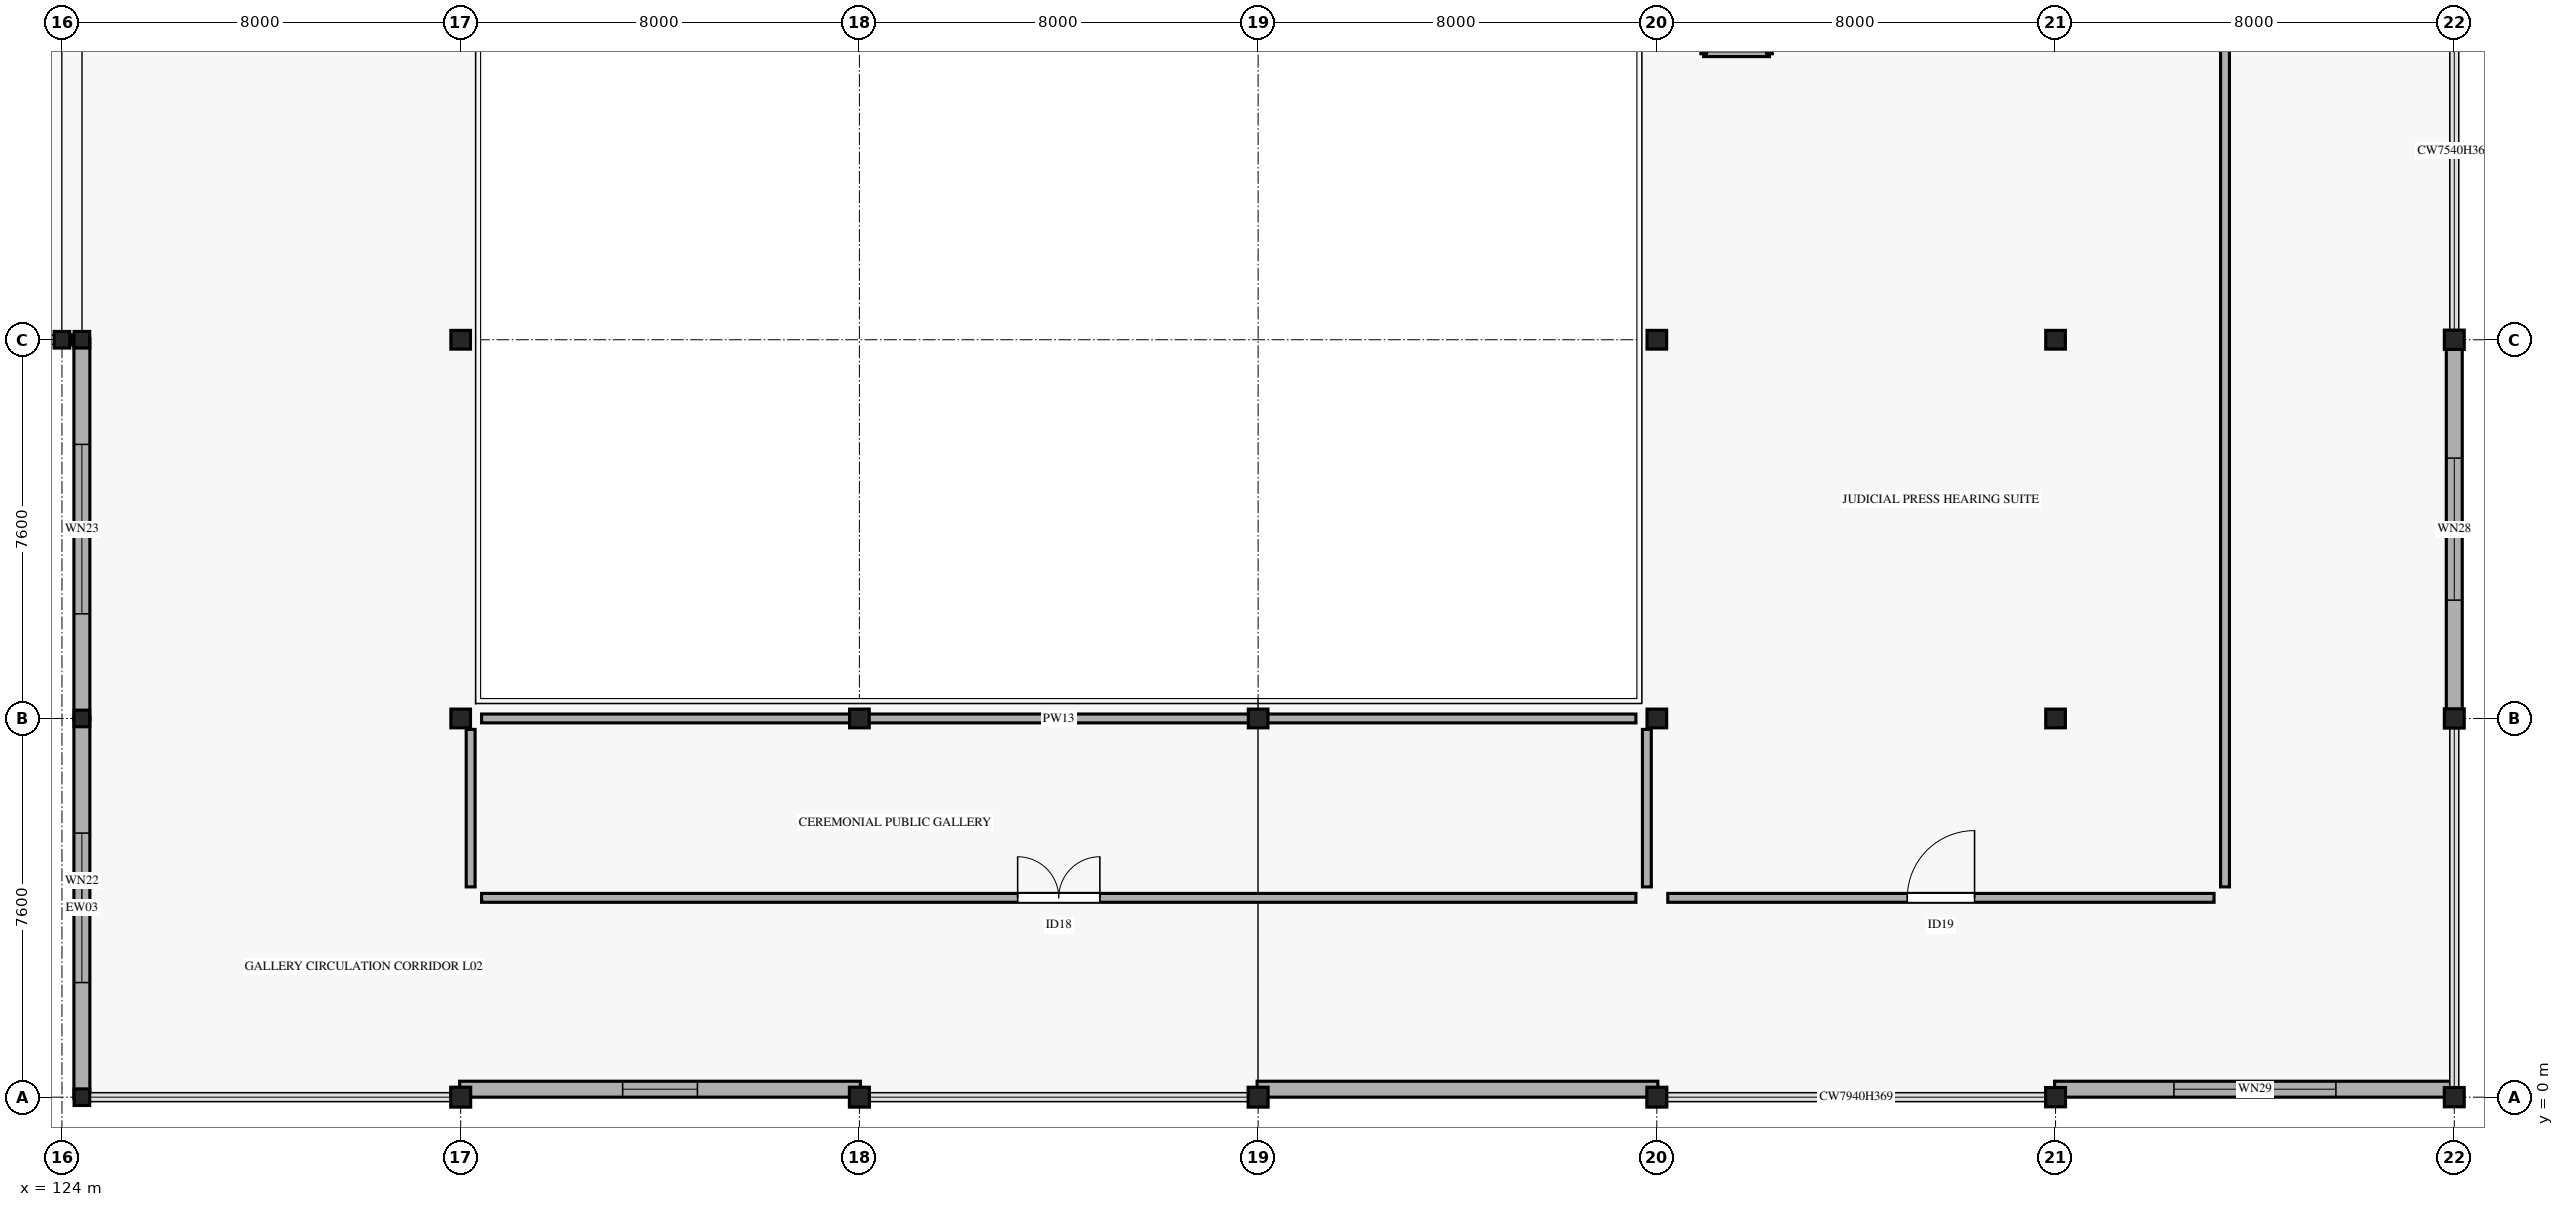
"""IFC4 building model, lengths in metres.
Left out: names, types, materials, properties, quantities, classifications, styles, units other than length and angle.
Written with IfcOpenShell. Run it as: python <this file> out.ifc"""

import sys

from ifc_helpers import new_model, si_unit, direction, frame, frame_2d, origin, origin_2d, place, context, subcontext, project, spatial, rectangle, i_section, extrude, element, fill, save


model = new_model("IFC4")
c1 = context("Model", 3, precision=1e-05, world=origin(), true_north=direction((0.0, 1.0)))
c2 = subcontext(c1, "Body", "Model", "MODEL_VIEW")
j1 = project(units=[si_unit("LENGTHUNIT", "METRE"), si_unit("PLANEANGLEUNIT", "RADIAN")], contexts=[c1])
p1 = place(None, origin())
s1 = spatial("IfcSite", under=j1, at=p1, CompositionType="ELEMENT")
p2 = place(p1, origin())
s2 = spatial("IfcBuilding", under=s1, at=p2, CompositionType="ELEMENT")
p3 = place(p2, frame((0.0, 0.0, 10.8)))
s3 = spatial("IfcBuildingStorey", under=s2, at=p3, CompositionType="ELEMENT", Elevation=10.8)
for number, where, z_axis, x_axis in (
    (1, (124.4, 0.0, 0.0), (0.0, 0.0, 1.0), (1.0, 0.0, 0.0)),
    (2, (124.4, 7.6, 0.0), (0.0, 0.0, 1.0), (1.0, 0.0, 0.0)),
    (3, (124.4, 15.2, 0.0), (0.0, 0.0, 1.0), (1.0, 0.0, 0.0)),
):
    element("IfcColumn", number, at=place(p3, frame(where, z_axis=z_axis, x_axis=x_axis)), inside=s3, PredefinedType="COLUMN", context=c2, shape_type="SweptSolid", body=[
        extrude(i_section(OverallWidth=0.313, OverallDepth=0.333, WebThickness=0.018, FlangeThickness=0.028, FilletRadius=0.015, at=origin_2d()), origin(), (0.0, 0.0, 1.0), 4.59),
    ])
p4 = place(p3, frame((132.0, 0.0, 0.0), z_axis=(0.0, 0.0, 1.0), x_axis=(1.0, 0.0, 0.0)))
e4 = element("IfcColumn", 4, at=p4, inside=s3, PredefinedType="COLUMN", context=c2, shape_type="SweptSolid", body=[
    extrude(i_section(OverallWidth=0.401, OverallDepth=0.399, WebThickness=0.025, FlangeThickness=0.04, FilletRadius=0.015, at=origin_2d()), origin(), (0.0, 0.0, 1.0), 4.59),
])
for number, where, z_axis, x_axis in (
    (5, (132.0, 7.6, 0.0), (0.0, 0.0, 1.0), (1.0, 0.0, 0.0)),
    (6, (132.0, 15.2, 0.0), (0.0, 0.0, 1.0), (1.0, 0.0, 0.0)),
):
    element("IfcColumn", number, at=place(p3, frame(where, z_axis=z_axis, x_axis=x_axis)), inside=s3, PredefinedType="COLUMN", context=c2, shape_type="SweptSolid", body=[
        extrude(i_section(OverallWidth=0.394, OverallDepth=0.376, WebThickness=0.017, FlangeThickness=0.028, FilletRadius=0.015, at=origin_2d()), origin(), (0.0, 0.0, 1.0), 4.59),
    ])
p5 = place(p3, frame((140.0, 0.0, 0.0), z_axis=(0.0, 0.0, 1.0), x_axis=(1.0, 0.0, 0.0)))
e7 = element("IfcColumn", 7, at=p5, inside=s3, PredefinedType="COLUMN", context=c2, shape_type="SweptSolid", body=[
    extrude(i_section(OverallWidth=0.401, OverallDepth=0.399, WebThickness=0.025, FlangeThickness=0.04, FilletRadius=0.015, at=origin_2d()), origin(), (0.0, 0.0, 1.0), 4.59),
])
p6 = place(p3, frame((140.0, 7.6, 0.0), z_axis=(0.0, 0.0, 1.0), x_axis=(1.0, 0.0, 0.0)))
e8 = element("IfcColumn", 8, at=p6, inside=s3, PredefinedType="COLUMN", context=c2, shape_type="SweptSolid", body=[
    extrude(i_section(OverallWidth=0.394, OverallDepth=0.376, WebThickness=0.017, FlangeThickness=0.028, FilletRadius=0.015, at=origin_2d()), origin(), (0.0, 0.0, 1.0), 4.59),
])
p7 = place(p3, frame((148.0, 0.0, 0.0), z_axis=(0.0, 0.0, 1.0), x_axis=(1.0, 0.0, 0.0)))
e9 = element("IfcColumn", 9, at=p7, inside=s3, PredefinedType="COLUMN", context=c2, shape_type="SweptSolid", body=[
    extrude(i_section(OverallWidth=0.401, OverallDepth=0.399, WebThickness=0.025, FlangeThickness=0.04, FilletRadius=0.015, at=origin_2d()), origin(), (0.0, 0.0, 1.0), 4.59),
])
p8 = place(p3, frame((148.0, 7.6, 0.0), z_axis=(0.0, 0.0, 1.0), x_axis=(1.0, 0.0, 0.0)))
e10 = element("IfcColumn", 10, at=p8, inside=s3, PredefinedType="COLUMN", context=c2, shape_type="SweptSolid", body=[
    extrude(i_section(OverallWidth=0.394, OverallDepth=0.376, WebThickness=0.017, FlangeThickness=0.028, FilletRadius=0.015, at=origin_2d()), origin(), (0.0, 0.0, 1.0), 4.59),
])
p9 = place(p3, frame((156.0, 0.0, 0.0), z_axis=(0.0, 0.0, 1.0), x_axis=(1.0, 0.0, 0.0)))
e11 = element("IfcColumn", 11, at=p9, inside=s3, PredefinedType="COLUMN", context=c2, shape_type="SweptSolid", body=[
    extrude(i_section(OverallWidth=0.401, OverallDepth=0.399, WebThickness=0.025, FlangeThickness=0.04, FilletRadius=0.015, at=origin_2d()), origin(), (0.0, 0.0, 1.0), 4.59),
])
for number, where, z_axis, x_axis in (
    (12, (156.0, 7.6, 0.0), (0.0, 0.0, 1.0), (1.0, 0.0, 0.0)),
    (13, (156.0, 15.2, 0.0), (0.0, 0.0, 1.0), (1.0, 0.0, 0.0)),
):
    element("IfcColumn", number, at=place(p3, frame(where, z_axis=z_axis, x_axis=x_axis)), inside=s3, PredefinedType="COLUMN", context=c2, shape_type="SweptSolid", body=[
        extrude(i_section(OverallWidth=0.394, OverallDepth=0.376, WebThickness=0.017, FlangeThickness=0.028, FilletRadius=0.015, at=origin_2d()), origin(), (0.0, 0.0, 1.0), 4.59),
    ])
p10 = place(p3, frame((164.0, 0.0, 0.0), z_axis=(0.0, 0.0, 1.0), x_axis=(1.0, 0.0, 0.0)))
e14 = element("IfcColumn", 14, at=p10, inside=s3, PredefinedType="COLUMN", context=c2, shape_type="SweptSolid", body=[
    extrude(i_section(OverallWidth=0.399, OverallDepth=0.387, WebThickness=0.021, FlangeThickness=0.033, FilletRadius=0.015, at=origin_2d()), origin(), (0.0, 0.0, 1.0), 4.59),
])
for number, where, z_axis, x_axis in (
    (15, (164.0, 7.6, 0.0), (0.0, 0.0, 1.0), (1.0, 0.0, 0.0)),
    (16, (164.0, 15.2, 0.0), (0.0, 0.0, 1.0), (1.0, 0.0, 0.0)),
):
    element("IfcColumn", number, at=place(p3, frame(where, z_axis=z_axis, x_axis=x_axis)), inside=s3, PredefinedType="COLUMN", context=c2, shape_type="SweptSolid", body=[
        extrude(i_section(OverallWidth=0.394, OverallDepth=0.376, WebThickness=0.017, FlangeThickness=0.028, FilletRadius=0.015, at=origin_2d()), origin(), (0.0, 0.0, 1.0), 4.59),
    ])
for number, where, z_axis, x_axis in (
    (17, (172.0, 0.0, 0.0), (0.0, 0.0, 1.0), (1.0, 0.0, 0.0)),
    (18, (172.0, 7.6, 0.0), (0.0, 0.0, 1.0), (1.0, 0.0, 0.0)),
    (19, (172.0, 15.2, 0.0), (0.0, 0.0, 1.0), (1.0, 0.0, 0.0)),
):
    element("IfcColumn", number, at=place(p3, frame(where, z_axis=z_axis, x_axis=x_axis)), inside=s3, PredefinedType="COLUMN", context=c2, shape_type="SweptSolid", body=[
        extrude(i_section(OverallWidth=0.399, OverallDepth=0.387, WebThickness=0.021, FlangeThickness=0.033, FilletRadius=0.015, at=origin_2d()), origin(), (0.0, 0.0, 1.0), 4.59),
    ])
p11 = place(p3, frame((124.0, 15.2, 0.0), z_axis=(0.0, 0.0, 1.0), x_axis=(1.0, 0.0, 0.0)))
e20 = element("IfcColumn", 20, at=p11, inside=s3, PredefinedType="COLUMN", context=c2, shape_type="SweptSolid", body=[
    extrude(i_section(OverallWidth=0.313, OverallDepth=0.333, WebThickness=0.018, FlangeThickness=0.028, FilletRadius=0.015, at=origin_2d()), origin(), (0.0, 0.0, 1.0), 4.59),
])
p12 = place(p3, frame((124.4, -0.02, 0.0), z_axis=(0.0, 0.0, 1.0), x_axis=(0.0, 1.0, 0.0)))
e21 = element("IfcWall", 21, at=p12, inside=s3, PredefinedType="STANDARD", context=c2, shape_type="SweptSolid", body=[
    extrude(rectangle(XDim=7.64, YDim=0.32, at=frame_2d((3.82, 0.0))), origin(), (0.0, 0.0, 1.0), 3.66),
])
p13 = place(p12, frame((2.32, 0.0, 0.75)))
e22 = element("IfcOpeningElement", 22, at=p13, cuts=e21, PredefinedType="OPENING", context=c2, shape_type="SweptSolid", body=[
    extrude(rectangle(XDim=3.0, YDim=1.8, at=frame_2d((1.5, 0.9))), frame((0.0, 0.17, 0.0), z_axis=(0.0, -1.0, 0.0), x_axis=(1.0, 0.0, 0.0)), (0.0, 0.0, 1.0), 0.34),
])
p14 = place(p3, frame((124.4, 7.58, 0.0), z_axis=(0.0, 0.0, 1.0), x_axis=(0.0, 1.0, 0.0)))
e23 = element("IfcWall", 23, at=p14, inside=s3, PredefinedType="STANDARD", context=c2, shape_type="SweptSolid", body=[
    extrude(rectangle(XDim=7.64, YDim=0.32, at=frame_2d((3.82, 0.0))), origin(), (0.0, 0.0, 1.0), 3.66),
])
p15 = place(p14, frame((2.12, 0.0, 0.75)))
e24 = element("IfcOpeningElement", 24, at=p15, cuts=e23, PredefinedType="OPENING", context=c2, shape_type="SweptSolid", body=[
    extrude(rectangle(XDim=3.4, YDim=1.8, at=frame_2d((1.7, 0.9))), frame((0.0, 0.17, 0.0), z_axis=(0.0, -1.0, 0.0), x_axis=(1.0, 0.0, 0.0)), (0.0, 0.0, 1.0), 0.34),
])
p16 = place(p3, frame((172.0, 15.22, 0.0), z_axis=(0.0, 0.0, 1.0), x_axis=(0.0, -1.0, 0.0)))
e25 = element("IfcWall", 25, at=p16, inside=s3, PredefinedType="STANDARD", context=c2, shape_type="SweptSolid", body=[
    extrude(rectangle(XDim=7.64, YDim=0.32, at=frame_2d((3.82, 0.0))), origin(), (0.0, 0.0, 1.0), 3.66),
])
p17 = place(p16, frame((2.395, 0.0, 0.75)))
e26 = element("IfcOpeningElement", 26, at=p17, cuts=e25, PredefinedType="OPENING", context=c2, shape_type="SweptSolid", body=[
    extrude(rectangle(XDim=2.85, YDim=1.55, at=frame_2d((1.425, 0.775))), frame((0.0, 0.17, 0.0), z_axis=(0.0, -1.0, 0.0), x_axis=(1.0, 0.0, 0.0)), (0.0, 0.0, 1.0), 0.34),
])
p18 = place(p3, frame((172.02, 0.16, 0.0), z_axis=(0.0, 0.0, 1.0), x_axis=(-1.0, 0.0, 0.0)))
e27 = element("IfcWall", 27, at=p18, inside=s3, PredefinedType="STANDARD", context=c2, shape_type="SweptSolid", body=[
    extrude(rectangle(XDim=8.04, YDim=0.32, at=frame_2d((4.02, 0.0))), origin(), (0.0, 0.0, 1.0), 3.66),
])
p19 = place(p18, frame((2.395, 0.0, 0.75)))
e28 = element("IfcOpeningElement", 28, at=p19, cuts=e27, PredefinedType="OPENING", context=c2, shape_type="SweptSolid", body=[
    extrude(rectangle(XDim=3.25, YDim=1.55, at=frame_2d((1.625, 0.775))), frame((0.0, 0.17, 0.0), z_axis=(0.0, -1.0, 0.0), x_axis=(1.0, 0.0, 0.0)), (0.0, 0.0, 1.0), 0.34),
])
p20 = place(p3, frame((156.02, 0.16, 0.0), z_axis=(0.0, 0.0, 1.0), x_axis=(-1.0, 0.0, 0.0)))
e29 = element("IfcWall", 29, at=p20, inside=s3, PredefinedType="STANDARD", context=c2, shape_type="SweptSolid", body=[
    extrude(rectangle(XDim=8.04, YDim=0.32, at=frame_2d((4.02, 0.0))), origin(), (0.0, 0.0, 1.0), 3.66),
])
p21 = place(p3, frame((140.02, 0.16, 0.0), z_axis=(0.0, 0.0, 1.0), x_axis=(-1.0, 0.0, 0.0)))
e30 = element("IfcWall", 30, at=p21, inside=s3, PredefinedType="STANDARD", context=c2, shape_type="SweptSolid", body=[
    extrude(rectangle(XDim=8.04, YDim=0.32, at=frame_2d((4.02, 0.0))), origin(), (0.0, 0.0, 1.0), 3.66),
])
p22 = place(p21, frame((3.27, 0.0, 0.75)))
e31 = element("IfcOpeningElement", 31, at=p22, cuts=e30, PredefinedType="OPENING", context=c2, shape_type="SweptSolid", body=[
    extrude(rectangle(XDim=1.5, YDim=1.3, at=frame_2d((0.75, 0.65))), frame((0.0, 0.17, 0.0), z_axis=(0.0, -1.0, 0.0), x_axis=(1.0, 0.0, 0.0)), (0.0, 0.0, 1.0), 0.34),
])
p23 = place(p3, frame((124.22, 15.2, 0.0), z_axis=(0.0, 0.0, 1.0), x_axis=(-1.0, 0.0, 0.0)))
e32 = element("IfcWall", 32, at=p23, inside=s3, PredefinedType="STANDARD", context=c2, shape_type="SweptSolid", body=[
    extrude(rectangle(XDim=0.04, YDim=0.205, at=frame_2d((0.02, 0.0))), origin(), (0.0, 0.0, 1.0), 4.02),
])
for number, where, z_axis, x_axis in (
    (33, (156.94, 20.94, 0.0), (0.0, 0.0, 1.0), (1.0, 0.0, 0.0)),
    (34, (158.26, 20.94, 0.0), (0.0, 0.0, 1.0), (0.0, 1.0, 0.0)),
    (35, (156.94, 22.26, 0.0), (0.0, 0.0, 1.0), (0.0, -1.0, 0.0)),
):
    element("IfcWall", number, at=place(p3, frame(where, z_axis=z_axis, x_axis=x_axis)), inside=s3, PredefinedType="PARTITIONING", context=c2, shape_type="SweptSolid", body=[
        extrude(rectangle(XDim=1.32, YDim=0.115, at=frame_2d((0.66, 0.0))), origin(), (0.0, 0.0, 1.0), 3.75),
    ])
p24 = place(p3, frame((132.42, 4.0, 0.0), z_axis=(0.0, 0.0, 1.0), x_axis=(1.0, 0.0, 0.0)))
e36 = element("IfcWall", 36, at=p24, inside=s3, PredefinedType="PARTITIONING", context=c2, shape_type="SweptSolid", body=[
    extrude(rectangle(XDim=23.16, YDim=0.178, at=frame_2d((11.58, 0.0))), origin(), (0.0, 0.0, 1.0), 3.45),
])
p25 = place(p24, frame((10.755, 0.0, 0.0)))
e37 = element("IfcOpeningElement", 37, at=p25, cuts=e36, PredefinedType="OPENING", context=c2, shape_type="SweptSolid", body=[
    extrude(rectangle(XDim=1.65, YDim=2.3, at=frame_2d((0.825, 1.15))), frame((0.0, 0.099, 0.0), z_axis=(0.0, -1.0, 0.0), x_axis=(1.0, 0.0, 0.0)), (0.0, 0.0, 1.0), 0.198),
])
p26 = place(p3, frame((132.2, 4.22, 0.0), z_axis=(0.0, 0.0, 1.0), x_axis=(0.0, 1.0, 0.0)))
e38 = element("IfcWall", 38, at=p26, inside=s3, PredefinedType="PARTITIONING", context=c2, shape_type="SweptSolid", body=[
    extrude(rectangle(XDim=3.16, YDim=0.178, at=frame_2d((1.58, 0.0))), origin(), (0.0, 0.0, 1.0), 3.45),
])
p27 = place(p3, frame((132.42, 7.6, 0.0), z_axis=(0.0, 0.0, 1.0), x_axis=(1.0, 0.0, 0.0)))
e39 = element("IfcWall", 39, at=p27, inside=s3, PredefinedType="PARTITIONING", context=c2, shape_type="SweptSolid", body=[
    extrude(rectangle(XDim=23.16, YDim=0.178, at=frame_2d((11.58, 0.0))), origin(), (0.0, 0.0, 1.0), 3.45),
])
p28 = place(p3, frame((155.8, 4.22, 0.0), z_axis=(0.0, 0.0, 1.0), x_axis=(0.0, 1.0, 0.0)))
e40 = element("IfcWall", 40, at=p28, inside=s3, PredefinedType="PARTITIONING", context=c2, shape_type="SweptSolid", body=[
    extrude(rectangle(XDim=3.16, YDim=0.178, at=frame_2d((1.58, 0.0))), origin(), (0.0, 0.0, 1.0), 3.45),
])
p29 = place(p3, frame((156.22, 4.0, 0.0), z_axis=(0.0, 0.0, 1.0), x_axis=(1.0, 0.0, 0.0)))
e41 = element("IfcWall", 41, at=p29, inside=s3, PredefinedType="PARTITIONING", context=c2, shape_type="SweptSolid", body=[
    extrude(rectangle(XDim=10.96, YDim=0.178, at=frame_2d((5.48, 0.0))), origin(), (0.0, 0.0, 1.0), 3.45),
])
p30 = place(p29, frame((4.805, 0.0, 0.0)))
e42 = element("IfcOpeningElement", 42, at=p30, cuts=e41, PredefinedType="OPENING", context=c2, shape_type="SweptSolid", body=[
    extrude(rectangle(XDim=1.35, YDim=2.25, at=frame_2d((0.675, 1.125))), frame((0.0, 0.099, 0.0), z_axis=(0.0, -1.0, 0.0), x_axis=(1.0, 0.0, 0.0)), (0.0, 0.0, 1.0), 0.198),
])
p31 = place(p3, frame((167.4, 4.22, 0.0), z_axis=(0.0, 0.0, 1.0), x_axis=(0.0, 1.0, 0.0)))
e43 = element("IfcWall", 43, at=p31, inside=s3, PredefinedType="PARTITIONING", context=c2, shape_type="SweptSolid", body=[
    extrude(rectangle(XDim=18.16, YDim=0.178, at=frame_2d((9.08, 0.0))), origin(), (0.0, 0.0, 1.0), 3.45),
])
p32 = place(p13, origin())
e44 = element("IfcWindow", 44, at=p32, inside=s3, PartitioningType="SINGLE_PANEL", PredefinedType="WINDOW", context=c2, shape_type="SweptSolid", body=[
    extrude(rectangle(XDim=3.0, YDim=1.8, at=frame_2d((1.5, 0.9))), frame((0.0, 0.03, 0.0), z_axis=(0.0, -1.0, 0.0), x_axis=(1.0, 0.0, 0.0)), (0.0, 0.0, 1.0), 0.06),
])
fill(e22, e44)
p33 = place(p15, origin())
e45 = element("IfcWindow", 45, at=p33, inside=s3, PartitioningType="SINGLE_PANEL", PredefinedType="WINDOW", context=c2, shape_type="SweptSolid", body=[
    extrude(rectangle(XDim=3.4, YDim=1.8, at=frame_2d((1.7, 0.9))), frame((0.0, 0.03, 0.0), z_axis=(0.0, -1.0, 0.0), x_axis=(1.0, 0.0, 0.0)), (0.0, 0.0, 1.0), 0.06),
])
fill(e24, e45)
p34 = place(p17, origin())
e46 = element("IfcWindow", 46, at=p34, inside=s3, PartitioningType="SINGLE_PANEL", PredefinedType="WINDOW", context=c2, shape_type="SweptSolid", body=[
    extrude(rectangle(XDim=2.85, YDim=1.55, at=frame_2d((1.425, 0.775))), frame((0.0, 0.03, 0.0), z_axis=(0.0, -1.0, 0.0), x_axis=(1.0, 0.0, 0.0)), (0.0, 0.0, 1.0), 0.06),
])
fill(e26, e46)
p35 = place(p19, origin())
e47 = element("IfcWindow", 47, at=p35, inside=s3, PartitioningType="SINGLE_PANEL", PredefinedType="WINDOW", context=c2, shape_type="SweptSolid", body=[
    extrude(rectangle(XDim=3.25, YDim=1.55, at=frame_2d((1.625, 0.775))), frame((0.0, 0.03, 0.0), z_axis=(0.0, -1.0, 0.0), x_axis=(1.0, 0.0, 0.0)), (0.0, 0.0, 1.0), 0.06),
])
fill(e28, e47)
p36 = place(p22, origin())
e48 = element("IfcWindow", 48, at=p36, inside=s3, PartitioningType="SINGLE_PANEL", PredefinedType="WINDOW", context=c2, shape_type="SweptSolid", body=[
    extrude(rectangle(XDim=1.5, YDim=1.3, at=frame_2d((0.75, 0.65))), frame((0.0, 0.03, 0.0), z_axis=(0.0, -1.0, 0.0), x_axis=(1.0, 0.0, 0.0)), (0.0, 0.0, 1.0), 0.06),
])
fill(e31, e48)
p37 = place(p25, origin())
e49 = element("IfcDoor", 49, at=p37, inside=s3, OperationType="DOUBLE_DOOR_SINGLE_SWING", PredefinedType="DOOR", context=c2, shape_type="SweptSolid", body=[
    extrude(rectangle(XDim=1.65, YDim=2.3, at=frame_2d((0.825, 1.15))), frame((0.0, 0.025, 0.0), z_axis=(0.0, -1.0, 0.0), x_axis=(1.0, 0.0, 0.0)), (0.0, 0.0, 1.0), 0.05),
])
fill(e37, e49)
p38 = place(p30, origin())
e50 = element("IfcDoor", 50, at=p38, inside=s3, OperationType="SINGLE_SWING_RIGHT", PredefinedType="DOOR", context=c2, shape_type="SweptSolid", body=[
    extrude(rectangle(XDim=1.35, YDim=2.25, at=frame_2d((0.675, 1.125))), frame((0.0, 0.025, 0.0), z_axis=(0.0, -1.0, 0.0), x_axis=(1.0, 0.0, 0.0)), (0.0, 0.0, 1.0), 0.05),
])
fill(e42, e50)
save(model, sys.argv[1])
